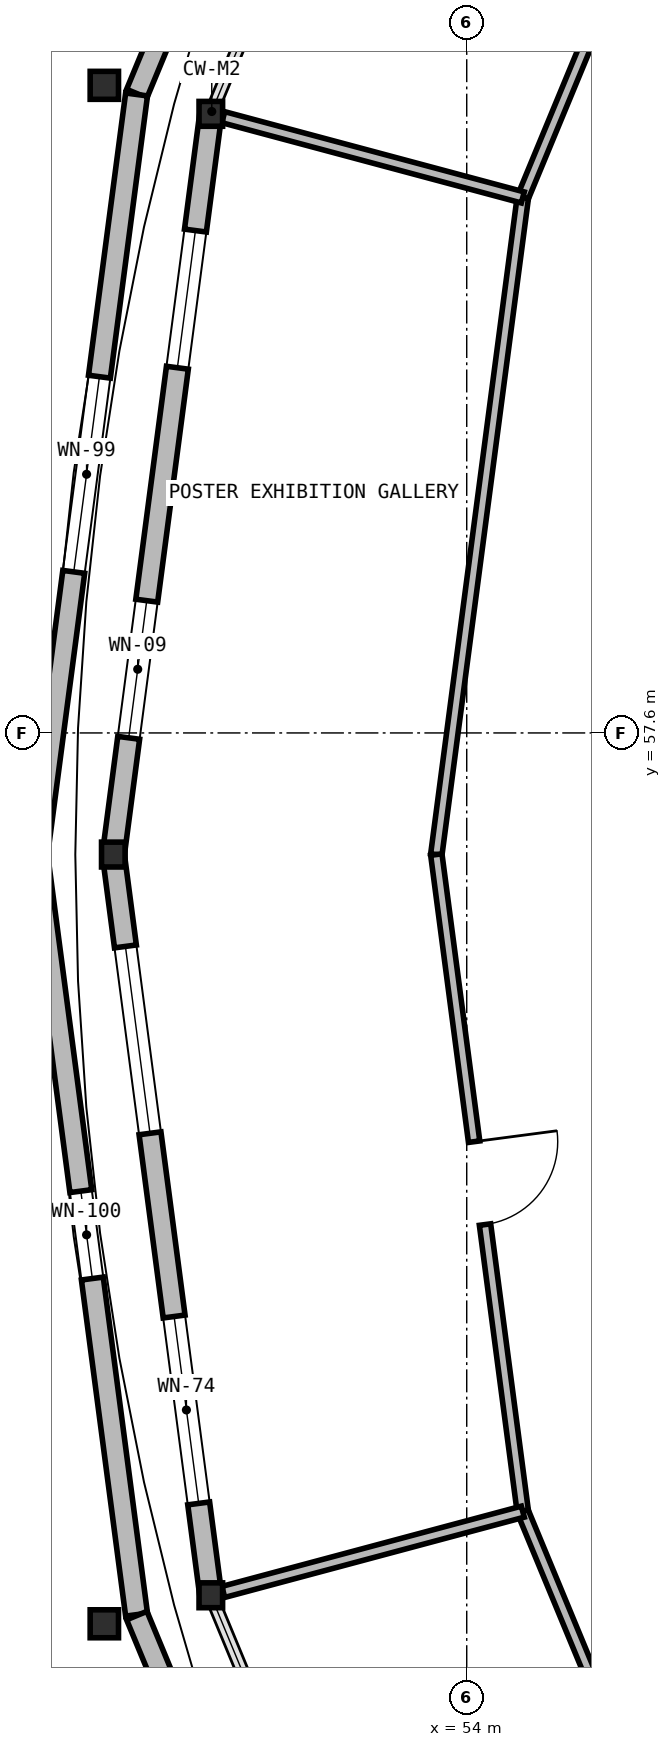
"""IFC4 building model, lengths in metres.
Left out: names, types, materials, properties, quantities, classifications, styles, units other than length and angle.
Written with IfcOpenShell. Run it as: python <this file> out.ifc"""

import sys

from ifc_helpers import new_model, si_unit, direction, frame, frame_2d, origin, origin_2d, place, context, subcontext, project, spatial, rectangle, i_section, extrude, element, fill, save


model = new_model("IFC4")
c1 = context("Model", 3, precision=1e-05, world=origin(), true_north=direction((0.0, 1.0)))
c2 = subcontext(c1, "Body", "Model", "MODEL_VIEW")
j1 = project(units=[si_unit("LENGTHUNIT", "METRE"), si_unit("PLANEANGLEUNIT", "RADIAN")], contexts=[c1])
p1 = place(None, origin())
s1 = spatial("IfcSite", under=j1, at=p1, CompositionType="ELEMENT")
p2 = place(p1, origin())
s2 = spatial("IfcBuilding", under=s1, at=p2, CompositionType="ELEMENT")
p3 = place(p2, frame((0.0, 0.0, 5.25)))
s3 = spatial("IfcBuildingStorey", under=s2, at=p3, CompositionType="ELEMENT", Elevation=5.25)
for number, where, z_axis, x_axis in (
    (1, (49.232, 66.12, 0.0), (0.0, 0.0, 1.0), (1.0, 0.0, 0.0)),
    (2, (49.232, 45.88, 0.0), (0.0, 0.0, 1.0), (1.0, 0.0, 0.0)),
):
    element("IfcColumn", number, at=place(p3, frame(where, z_axis=z_axis, x_axis=x_axis)), inside=s3, PredefinedType="COLUMN", context=c2, shape_type="SweptSolid", body=[
        extrude(i_section(OverallWidth=0.373, OverallDepth=0.368, WebThickness=0.017, FlangeThickness=0.027, at=origin_2d()), origin(), (0.0, 0.0, 1.0), 4.55),
    ])
for number, where, z_axis, x_axis in (
    (3, (50.633, 65.745, 0.0), (0.0, 0.0, 1.0), (1.0, 0.0, 0.0)),
    (4, (49.35, 56.0, 0.0), (0.0, 0.0, 1.0), (1.0, 0.0, 0.0)),
    (5, (50.633, 46.255, 0.0), (0.0, 0.0, 1.0), (1.0, 0.0, 0.0)),
):
    element("IfcColumn", number, at=place(p3, frame(where, z_axis=z_axis, x_axis=x_axis)), inside=s3, PredefinedType="COLUMN", context=c2, shape_type="SweptSolid", body=[
        extrude(i_section(OverallWidth=0.31, OverallDepth=0.327, WebThickness=0.016, FlangeThickness=0.025, at=origin_2d()), origin(), (0.0, 0.0, 1.0), 4.55),
    ])
p4 = place(p3, frame((53.517, 75.325, 0.0), z_axis=(0.0, 0.0, 1.0), x_axis=(-0.382733240508, -0.92385889973, 0.0)))
e6 = element("IfcWall", 6, at=p4, inside=s3, PredefinedType="SOLIDWALL", context=c2, shape_type="SweptSolid", body=[
    extrude(rectangle(XDim=10.081, YDim=0.29, at=frame_2d((5.04, 0.0))), origin(), (0.0, 0.0, 1.0), 4.37),
])
p5 = place(p4, frame((3.91, 0.0, 0.95)))
e7 = element("IfcOpeningElement", 7, at=p5, cuts=e6, PredefinedType="OPENING", context=c2, shape_type="SweptSolid", body=[
    extrude(rectangle(XDim=2.26, YDim=1.67, at=frame_2d((1.13, 0.835))), frame((0.0, 0.155, 0.0), z_axis=(0.0, -1.0, 0.0), x_axis=(1.0, 0.0, 0.0)), (0.0, 0.0, 1.0), 0.31),
])
p6 = place(p3, frame((49.656, 66.0, 0.0), z_axis=(0.0, 0.0, 1.0), x_axis=(-0.130450126879, -0.991454872597, 0.0)))
e8 = element("IfcWall", 8, at=p6, inside=s3, PredefinedType="SOLIDWALL", context=c2, shape_type="SweptSolid", body=[
    extrude(rectangle(XDim=10.08, YDim=0.29, at=frame_2d((5.04, 0.0))), origin(), (0.0, 0.0, 1.0), 3.732),
])
p7 = place(p6, frame((3.745, 0.0, 0.95)))
e9 = element("IfcOpeningElement", 9, at=p7, cuts=e8, PredefinedType="OPENING", context=c2, shape_type="SweptSolid", body=[
    extrude(rectangle(XDim=2.59, YDim=1.59, at=frame_2d((1.295, 0.795))), frame((0.0, 0.155, 0.0), z_axis=(0.0, -1.0, 0.0), x_axis=(1.0, 0.0, 0.0)), (0.0, 0.0, 1.0), 0.31),
])
p8 = place(p3, frame((48.341, 55.994, 0.0), z_axis=(0.0, 0.0, 1.0), x_axis=(0.130450126879, -0.991454872597, 0.0)))
e10 = element("IfcWall", 10, at=p8, inside=s3, PredefinedType="SOLIDWALL", context=c2, shape_type="SweptSolid", body=[
    extrude(rectangle(XDim=10.08, YDim=0.29, at=frame_2d((5.04, 0.0))), origin(), (0.0, 0.0, 1.0), 3.732),
])
p9 = place(p8, frame((4.46, 0.0, 0.95)))
e11 = element("IfcOpeningElement", 11, at=p9, cuts=e10, PredefinedType="OPENING", context=c2, shape_type="SweptSolid", body=[
    extrude(rectangle(XDim=1.16, YDim=1.51, at=frame_2d((0.58, 0.755))), frame((0.0, 0.155, 0.0), z_axis=(0.0, -1.0, 0.0), x_axis=(1.0, 0.0, 0.0)), (0.0, 0.0, 1.0), 0.31),
])
p10 = place(p3, frame((49.659, 45.988, 0.0), z_axis=(0.0, 0.0, 1.0), x_axis=(0.382733240508, -0.92385889973, 0.0)))
e12 = element("IfcWall", 12, at=p10, inside=s3, PredefinedType="SOLIDWALL", context=c2, shape_type="SweptSolid", body=[
    extrude(rectangle(XDim=10.081, YDim=0.29, at=frame_2d((5.04, 0.0))), origin(), (0.0, 0.0, 1.0), 3.815),
])
p11 = place(p10, frame((4.295, 0.0, 0.95)))
e13 = element("IfcOpeningElement", 13, at=p11, cuts=e12, PredefinedType="OPENING", context=c2, shape_type="SweptSolid", body=[
    extrude(rectangle(XDim=1.49, YDim=1.43, at=frame_2d((0.745, 0.715))), frame((0.0, 0.155, 0.0), z_axis=(0.0, -1.0, 0.0), x_axis=(1.0, 0.0, 0.0)), (0.0, 0.0, 1.0), 0.31),
])
p12 = place(p3, frame((49.351, 56.004, 0.0), z_axis=(0.0, 0.0, 1.0), x_axis=(0.130435863969, 0.991456749128, 0.0)))
e14 = element("IfcWall", 14, at=p12, inside=s3, PredefinedType="SOLIDWALL", context=c2, shape_type="SweptSolid", body=[
    extrude(rectangle(XDim=9.821, YDim=0.29, at=frame_2d((4.911, 0.0))), origin(), (0.0, 0.0, 1.0), 3.81),
])
p13 = place(p12, frame((1.545, 0.0, 0.95)))
e15 = element("IfcOpeningElement", 15, at=p13, cuts=e14, PredefinedType="OPENING", context=c2, shape_type="SweptSolid", body=[
    extrude(rectangle(XDim=1.82, YDim=1.4, at=frame_2d((0.91, 0.7))), frame((0.0, 0.155, 0.0), z_axis=(0.0, -1.0, 0.0), x_axis=(1.0, 0.0, 0.0)), (0.0, 0.0, 1.0), 0.31),
])
p14 = place(p12, frame((6.456, 0.0, 0.95)))
e16 = element("IfcOpeningElement", 16, at=p14, cuts=e14, PredefinedType="OPENING", context=c2, shape_type="SweptSolid", body=[
    extrude(rectangle(XDim=1.82, YDim=1.4, at=frame_2d((0.91, 0.7))), frame((0.0, 0.155, 0.0), z_axis=(0.0, -1.0, 0.0), x_axis=(1.0, 0.0, 0.0)), (0.0, 0.0, 1.0), 0.31),
])
p15 = place(p3, frame((50.632, 46.259, 0.0), z_axis=(0.0, 0.0, 1.0), x_axis=(-0.130435863969, 0.991456749128, 0.0)))
e17 = element("IfcWall", 17, at=p15, inside=s3, PredefinedType="SOLIDWALL", context=c2, shape_type="SweptSolid", body=[
    extrude(rectangle(XDim=9.821, YDim=0.29, at=frame_2d((4.911, 0.0))), origin(), (0.0, 0.0, 1.0), 3.81),
])
p16 = place(p15, frame((1.215, 0.0, 0.95)))
e18 = element("IfcOpeningElement", 18, at=p16, cuts=e17, PredefinedType="OPENING", context=c2, shape_type="SweptSolid", body=[
    extrude(rectangle(XDim=2.48, YDim=1.72, at=frame_2d((1.24, 0.86))), frame((0.0, 0.155, 0.0), z_axis=(0.0, -1.0, 0.0), x_axis=(1.0, 0.0, 0.0)), (0.0, 0.0, 1.0), 0.31),
])
p17 = place(p15, frame((6.126, 0.0, 0.95)))
e19 = element("IfcOpeningElement", 19, at=p17, cuts=e17, PredefinedType="OPENING", context=c2, shape_type="SweptSolid", body=[
    extrude(rectangle(XDim=2.48, YDim=1.72, at=frame_2d((1.24, 0.86))), frame((0.0, 0.155, 0.0), z_axis=(0.0, -1.0, 0.0), x_axis=(1.0, 0.0, 0.0)), (0.0, 0.0, 1.0), 0.31),
])
p18 = place(p3, frame((58.075, 72.7, 0.0), z_axis=(0.0, 0.0, 1.0), x_axis=(-0.382727695016, -0.923861197079, 0.0)))
e20 = element("IfcWall", 20, at=p18, inside=s3, PredefinedType="PARTITIONING", context=c2, shape_type="SweptSolid", body=[
    extrude(rectangle(XDim=8.719, YDim=0.15, at=frame_2d((4.359, 0.0))), origin(), (0.0, 0.0, 1.0), 3.815),
])
p19 = place(p3, frame((54.738, 64.645, 0.0), z_axis=(0.0, 0.0, 1.0), x_axis=(-0.130503763364, -0.991447813931, 0.0)))
e21 = element("IfcWall", 21, at=p19, inside=s3, PredefinedType="PARTITIONING", context=c2, shape_type="SweptSolid", body=[
    extrude(rectangle(XDim=8.719, YDim=0.15, at=frame_2d((4.36, 0.0))), origin(), (0.0, 0.0, 1.0), 3.815),
])
p20 = place(p3, frame((53.6, 56.0, 0.0), z_axis=(0.0, 0.0, 1.0), x_axis=(0.130503763364, -0.991447813931, 0.0)))
e22 = element("IfcWall", 22, at=p20, inside=s3, PredefinedType="PARTITIONING", context=c2, shape_type="SweptSolid", body=[
    extrude(rectangle(XDim=8.719, YDim=0.15, at=frame_2d((4.36, 0.0))), origin(), (0.0, 0.0, 1.0), 3.815),
])
p21 = place(p20, frame((3.81, 0.0, 0.0)))
e23 = element("IfcOpeningElement", 23, at=p21, cuts=e22, PredefinedType="OPENING", context=c2, shape_type="SweptSolid", body=[
    extrude(rectangle(XDim=1.1, YDim=2.2, at=frame_2d((0.55, 1.1))), frame((0.0, 0.085, 0.0), z_axis=(0.0, -1.0, 0.0), x_axis=(1.0, 0.0, 0.0)), (0.0, 0.0, 1.0), 0.17),
])
p22 = place(p3, frame((54.738, 47.355, 0.0), z_axis=(0.0, 0.0, 1.0), x_axis=(0.382727695016, -0.923861197079, 0.0)))
e24 = element("IfcWall", 24, at=p22, inside=s3, PredefinedType="PARTITIONING", context=c2, shape_type="SweptSolid", body=[
    extrude(rectangle(XDim=8.719, YDim=0.15, at=frame_2d((4.359, 0.0))), origin(), (0.0, 0.0, 1.0), 4.23),
])
p23 = place(p22, frame((3.81, 0.0, 0.0)))
e25 = element("IfcOpeningElement", 25, at=p23, cuts=e24, PredefinedType="OPENING", context=c2, shape_type="SweptSolid", body=[
    extrude(rectangle(XDim=1.1, YDim=2.2, at=frame_2d((0.55, 1.1))), frame((0.0, 0.085, 0.0), z_axis=(0.0, -1.0, 0.0), x_axis=(1.0, 0.0, 0.0)), (0.0, 0.0, 1.0), 0.17),
])
p24 = place(p3, frame((54.738, 64.645, 0.0), z_axis=(0.0, 0.0, 1.0), x_axis=(-0.965929354699, 0.258805876538, 0.0)))
e26 = element("IfcWall", 26, at=p24, inside=s3, PredefinedType="PARTITIONING", context=c2, shape_type="SweptSolid", body=[
    extrude(rectangle(XDim=4.08, YDim=0.15, at=frame_2d((2.04, 0.0))), origin(), (0.0, 0.0, 1.0), 3.815),
])
p25 = place(p3, frame((54.738, 47.355, 0.0), z_axis=(0.0, 0.0, 1.0), x_axis=(-0.965929354699, -0.258805876538, 0.0)))
e27 = element("IfcWall", 27, at=p25, inside=s3, PredefinedType="PARTITIONING", context=c2, shape_type="SweptSolid", body=[
    extrude(rectangle(XDim=4.08, YDim=0.15, at=frame_2d((2.04, 0.0))), origin(), (0.0, 0.0, 1.0), 3.897),
])
p26 = place(p7, origin())
e28 = element("IfcWindow", 28, at=p26, inside=s3, PartitioningType="SINGLE_PANEL", PredefinedType="WINDOW", context=c2, shape_type="SweptSolid", body=[
    extrude(rectangle(XDim=2.59, YDim=1.59, at=frame_2d((1.295, 0.795))), frame((0.0, 0.03, 0.0), z_axis=(0.0, -1.0, 0.0), x_axis=(1.0, 0.0, 0.0)), (0.0, 0.0, 1.0), 0.06),
])
fill(e9, e28)
p27 = place(p9, origin())
e29 = element("IfcWindow", 29, at=p27, inside=s3, PartitioningType="SINGLE_PANEL", PredefinedType="WINDOW", context=c2, shape_type="SweptSolid", body=[
    extrude(rectangle(XDim=1.16, YDim=1.51, at=frame_2d((0.58, 0.755))), frame((0.0, 0.03, 0.0), z_axis=(0.0, -1.0, 0.0), x_axis=(1.0, 0.0, 0.0)), (0.0, 0.0, 1.0), 0.06),
])
fill(e11, e29)
p28 = place(p13, origin())
e30 = element("IfcWindow", 30, at=p28, inside=s3, PartitioningType="SINGLE_PANEL", PredefinedType="WINDOW", context=c2, shape_type="SweptSolid", body=[
    extrude(rectangle(XDim=1.82, YDim=1.4, at=frame_2d((0.91, 0.7))), frame((0.0, 0.03, 0.0), z_axis=(0.0, -1.0, 0.0), x_axis=(1.0, 0.0, 0.0)), (0.0, 0.0, 1.0), 0.06),
])
fill(e15, e30)
p29 = place(p14, origin())
e31 = element("IfcWindow", 31, at=p29, inside=s3, PartitioningType="SINGLE_PANEL", PredefinedType="WINDOW", context=c2, shape_type="SweptSolid", body=[
    extrude(rectangle(XDim=1.82, YDim=1.4, at=frame_2d((0.91, 0.7))), frame((0.0, 0.03, 0.0), z_axis=(0.0, -1.0, 0.0), x_axis=(1.0, 0.0, 0.0)), (0.0, 0.0, 1.0), 0.06),
])
fill(e16, e31)
p30 = place(p16, origin())
e32 = element("IfcWindow", 32, at=p30, inside=s3, PartitioningType="SINGLE_PANEL", PredefinedType="WINDOW", context=c2, shape_type="SweptSolid", body=[
    extrude(rectangle(XDim=2.48, YDim=1.72, at=frame_2d((1.24, 0.86))), frame((0.0, 0.03, 0.0), z_axis=(0.0, -1.0, 0.0), x_axis=(1.0, 0.0, 0.0)), (0.0, 0.0, 1.0), 0.06),
])
fill(e18, e32)
p31 = place(p17, origin())
e33 = element("IfcWindow", 33, at=p31, inside=s3, PartitioningType="SINGLE_PANEL", PredefinedType="WINDOW", context=c2, shape_type="SweptSolid", body=[
    extrude(rectangle(XDim=2.48, YDim=1.72, at=frame_2d((1.24, 0.86))), frame((0.0, 0.03, 0.0), z_axis=(0.0, -1.0, 0.0), x_axis=(1.0, 0.0, 0.0)), (0.0, 0.0, 1.0), 0.06),
])
fill(e19, e33)
p32 = place(p21, origin())
e34 = element("IfcDoor", 34, at=p32, inside=s3, OperationType="SINGLE_SWING_LEFT", PredefinedType="DOOR", context=c2, shape_type="SweptSolid", body=[
    extrude(rectangle(XDim=1.1, YDim=2.2, at=frame_2d((0.55, 1.1))), frame((0.0, 0.025, 0.0), z_axis=(0.0, -1.0, 0.0), x_axis=(1.0, 0.0, 0.0)), (0.0, 0.0, 1.0), 0.05),
])
fill(e23, e34)
save(model, sys.argv[1])
